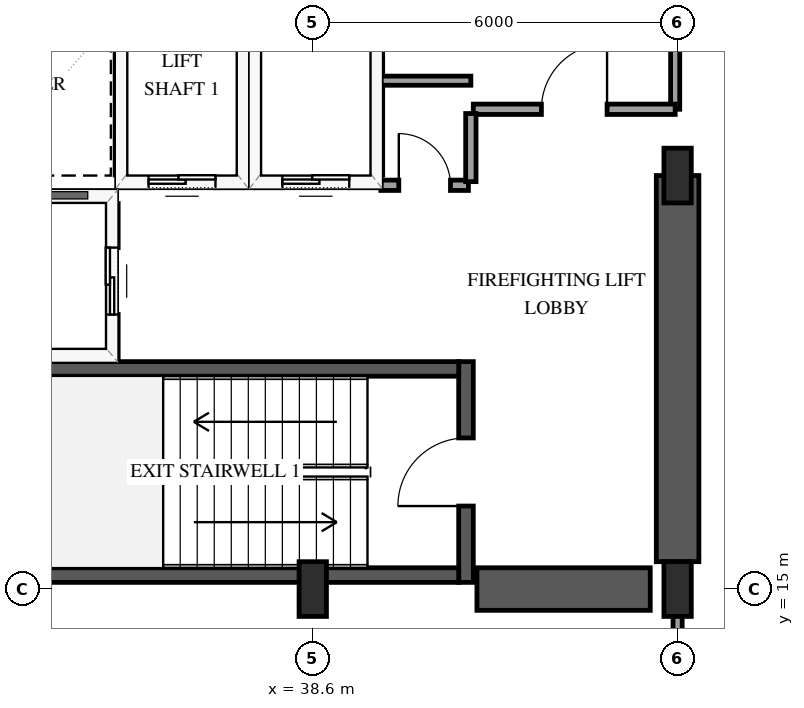
"""IFC4 building model, lengths in metres.
Left out: names, types, materials, properties, quantities, classifications, styles, units other than length and angle.
Written with IfcOpenShell. Run it as: python <this file> out.ifc"""

import sys

from ifc_helpers import new_model, si_unit, direction, frame, frame_2d, origin, origin_2d, place, context, subcontext, project, spatial, rectangle, extrude, element, fill, save


model = new_model("IFC4")
c1 = context("Model", 3, precision=1e-05, world=origin(), true_north=direction((0.0, 1.0)))
c2 = subcontext(c1, "Body", "Model", "MODEL_VIEW")
j1 = project(units=[si_unit("LENGTHUNIT", "METRE"), si_unit("PLANEANGLEUNIT", "RADIAN")], contexts=[c1])
p1 = place(None, origin())
s1 = spatial("IfcSite", under=j1, at=p1, CompositionType="ELEMENT")
p2 = place(p1, origin())
s2 = spatial("IfcBuilding", under=s1, at=p2, CompositionType="ELEMENT")
p3 = place(p2, frame((0.0, 0.0, 20.7)))
s3 = spatial("IfcBuildingStorey", under=s2, at=p3, CompositionType="ELEMENT", Elevation=20.7)
p4 = place(p3, frame((41.12, 15.11, 0.0), z_axis=(0.0, 0.0, 1.0), x_axis=(0.0, 1.0, 0.0)))
e1 = element("IfcWall", 1, at=p4, inside=s3, PredefinedType="SHEAR", context=c2, shape_type="SweptSolid", body=[
    extrude(rectangle(XDim=3.63, YDim=0.24, at=frame_2d((1.815, 0.0))), origin(), (0.0, 0.0, 1.0), 4.5),
])
p5 = place(p4, frame((1.255, 0.0, 0.0)))
e2 = element("IfcOpeningElement", 2, at=p5, cuts=e1, PredefinedType="OPENING", context=c2, shape_type="SweptSolid", body=[
    extrude(rectangle(XDim=1.12, YDim=2.15, at=frame_2d((0.56, 1.075))), frame((0.0, 0.13, 0.0), z_axis=(0.0, -1.0, 0.0), x_axis=(1.0, 0.0, 0.0)), (0.0, 0.0, 1.0), 0.26),
])
for number, where, z_axis, x_axis in (
    (3, (33.0, 15.23, 0.0), (0.0, 0.0, 1.0), (1.0, 0.0, 0.0)),
    (4, (33.0, 18.62, 0.0), (0.0, 0.0, 1.0), (1.0, 0.0, 0.0)),
):
    element("IfcWall", number, at=place(p3, frame(where, z_axis=z_axis, x_axis=x_axis)), inside=s3, PredefinedType="SHEAR", context=c2, shape_type="SweptSolid", body=[
        extrude(rectangle(XDim=8.0, YDim=0.24, at=frame_2d((4.0, 0.0))), origin(), (0.0, 0.0, 1.0), 4.5),
    ])
p6 = place(p3, frame((41.3, 15.0, 0.0), z_axis=(0.0, 0.0, 1.0), x_axis=(1.0, 0.0, 0.0)))
e5 = element("IfcWall", 5, at=p6, inside=s3, PredefinedType="SHEAR", context=c2, shape_type="SweptSolid", body=[
    extrude(rectangle(XDim=2.85, YDim=0.7, at=frame_2d((1.425, 0.0))), origin(), (0.0, 0.0, 1.0), 4.5),
])
p7 = place(p3, frame((44.6, 15.45, 0.0), z_axis=(0.0, 0.0, 1.0), x_axis=(0.0, 1.0, 0.0)))
e6 = element("IfcWall", 6, at=p7, inside=s3, PredefinedType="SHEAR", context=c2, shape_type="SweptSolid", body=[
    extrude(rectangle(XDim=6.35, YDim=0.7, at=frame_2d((3.175, 0.0))), origin(), (0.0, 0.0, 1.0), 4.5),
])
for number, where, z_axis, x_axis in (
    (7, (38.6, 15.0, 0.0), (0.0, 0.0, 1.0), (1.0, 0.0, 0.0)),
    (8, (44.6, 15.0, 0.0), (0.0, 0.0, 1.0), (1.0, 0.0, 0.0)),
    (9, (44.6, 21.8, 0.0), (0.0, 0.0, 1.0), (1.0, 0.0, 0.0)),
):
    element("IfcColumn", number, at=place(p3, frame(where, z_axis=z_axis, x_axis=x_axis)), inside=s3, PredefinedType="PILASTER", context=c2, shape_type="SweptSolid", body=[
        extrude(rectangle(XDim=0.45, YDim=0.9, at=origin_2d()), origin(), (0.0, 0.0, 1.0), 4.5),
    ])
p8 = place(p3, frame((35.45, 21.7, 0.0), z_axis=(0.0, 0.0, 1.0), x_axis=(1.0, 0.0, 0.0)))
e10 = element("IfcWall", 10, at=p8, inside=s3, PredefinedType="SOLIDWALL", context=c2, shape_type="SweptSolid", body=[
    extrude(rectangle(XDim=2.0, YDim=0.2, at=frame_2d((1.0, 0.0))), origin(), (0.0, 0.0, 1.0), 4.18),
])
p9 = place(p8, frame((0.45, 0.0, 0.0)))
e11 = element("IfcOpeningElement", 11, at=p9, cuts=e10, PredefinedType="OPENING", context=c2, shape_type="SweptSolid", body=[
    extrude(rectangle(XDim=1.1, YDim=2.15, at=frame_2d((0.55, 1.075))), frame((0.0, 0.11, 0.0), z_axis=(0.0, -1.0, 0.0), x_axis=(1.0, 0.0, 0.0)), (0.0, 0.0, 1.0), 0.22),
])
for number, where, z_axis, x_axis in (
    (12, (35.45, 21.81, 0.0), (0.0, 0.0, 1.0), (0.0, 1.0, 0.0)),
    (13, (37.45, 21.81, 0.0), (0.0, 0.0, 1.0), (0.0, 1.0, 0.0)),
):
    element("IfcWall", number, at=place(p3, frame(where, z_axis=z_axis, x_axis=x_axis)), inside=s3, PredefinedType="SOLIDWALL", context=c2, shape_type="SweptSolid", body=[
        extrude(rectangle(XDim=2.38, YDim=0.2, at=frame_2d((1.19, 0.0))), origin(), (0.0, 0.0, 1.0), 4.18),
    ])
p10 = place(p3, frame((37.65, 21.7, 0.0), z_axis=(0.0, 0.0, 1.0), x_axis=(1.0, 0.0, 0.0)))
e14 = element("IfcWall", 14, at=p10, inside=s3, PredefinedType="SOLIDWALL", context=c2, shape_type="SweptSolid", body=[
    extrude(rectangle(XDim=2.0, YDim=0.2, at=frame_2d((1.0, 0.0))), origin(), (0.0, 0.0, 1.0), 4.18),
])
p11 = place(p10, frame((0.45, 0.0, 0.0)))
e15 = element("IfcOpeningElement", 15, at=p11, cuts=e14, PredefinedType="OPENING", context=c2, shape_type="SweptSolid", body=[
    extrude(rectangle(XDim=1.1, YDim=2.15, at=frame_2d((0.55, 1.075))), frame((0.0, 0.11, 0.0), z_axis=(0.0, -1.0, 0.0), x_axis=(1.0, 0.0, 0.0)), (0.0, 0.0, 1.0), 0.22),
])
p12 = place(p3, frame((39.65, 21.81, 0.0), z_axis=(0.0, 0.0, 1.0), x_axis=(0.0, 1.0, 0.0)))
e16 = element("IfcWall", 16, at=p12, inside=s3, PredefinedType="SOLIDWALL", context=c2, shape_type="SweptSolid", body=[
    extrude(rectangle(XDim=2.38, YDim=0.2, at=frame_2d((1.19, 0.0))), origin(), (0.0, 0.0, 1.0), 4.18),
])
p13 = place(p3, frame((32.72, 21.45, 0.0), z_axis=(0.0, 0.0, 1.0), x_axis=(1.0, 0.0, 0.0)))
e17 = element("IfcWall", 17, at=p13, inside=s3, PredefinedType="SOLIDWALL", context=c2, shape_type="SweptSolid", body=[
    extrude(rectangle(XDim=2.58, YDim=0.2, at=frame_2d((1.29, 0.0))), origin(), (0.0, 0.0, 1.0), 4.18),
])
p14 = place(p3, frame((35.3, 18.79, 0.0), z_axis=(0.0, 0.0, 1.0), x_axis=(0.0, 1.0, 0.0)))
e18 = element("IfcWall", 18, at=p14, inside=s3, PredefinedType="SOLIDWALL", context=c2, shape_type="SweptSolid", body=[
    extrude(rectangle(XDim=2.55, YDim=0.2, at=frame_2d((1.275, 0.0))), origin(), (0.0, 0.0, 1.0), 4.18),
])
p15 = place(p14, frame((0.725, 0.0, 0.0)))
e19 = element("IfcOpeningElement", 19, at=p15, cuts=e18, PredefinedType="OPENING", context=c2, shape_type="SweptSolid", body=[
    extrude(rectangle(XDim=1.1, YDim=2.15, at=frame_2d((0.55, 1.075))), frame((0.0, 0.11, 0.0), z_axis=(0.0, -1.0, 0.0), x_axis=(1.0, 0.0, 0.0)), (0.0, 0.0, 1.0), 0.22),
])
p16 = place(p3, frame((44.56, 29.8, 0.0), z_axis=(0.0, 0.0, 1.0), x_axis=(0.0, -1.0, 0.0)))
e20 = element("IfcWall", 20, at=p16, inside=s3, PredefinedType="PARTITIONING", context=c2, shape_type="SweptSolid", body=[
    extrude(rectangle(XDim=6.91, YDim=0.15, at=frame_2d((3.455, 0.0))), origin(), (0.0, 0.0, 1.0), 3.22),
])
p17 = place(p16, frame((2.915, 0.0, 0.0)))
e21 = element("IfcOpeningElement", 21, at=p17, cuts=e20, PredefinedType="OPENING", context=c2, shape_type="SweptSolid", body=[
    extrude(rectangle(XDim=1.38, YDim=2.2, at=frame_2d((0.69, 1.1))), frame((0.0, 0.085, 0.0), z_axis=(0.0, -1.0, 0.0), x_axis=(1.0, 0.0, 0.0)), (0.0, 0.0, 1.0), 0.17),
])
p18 = place(p3, frame((41.24, 22.89, 0.0), z_axis=(0.0, 0.0, 1.0), x_axis=(1.0, 0.0, 0.0)))
e22 = element("IfcWall", 22, at=p18, inside=s3, PredefinedType="PARTITIONING", context=c2, shape_type="SweptSolid", body=[
    extrude(rectangle(XDim=3.32, YDim=0.17, at=frame_2d((1.66, 0.0))), origin(), (0.0, 0.0, 1.0), 4.18),
])
p19 = place(p18, frame((1.12, 0.0, 0.0)))
e23 = element("IfcOpeningElement", 23, at=p19, cuts=e22, PredefinedType="OPENING", context=c2, shape_type="SweptSolid", body=[
    extrude(rectangle(XDim=1.08, YDim=2.15, at=frame_2d((0.54, 1.075))), frame((0.0, 0.095, 0.0), z_axis=(0.0, -1.0, 0.0), x_axis=(1.0, 0.0, 0.0)), (0.0, 0.0, 1.0), 0.19),
])
p20 = place(p3, frame((44.6, 11.87, 0.0), z_axis=(0.0, 0.0, 1.0), x_axis=(0.0, 1.0, 0.0)))
e24 = element("IfcWall", 24, at=p20, inside=s3, PredefinedType="PARTITIONING", context=c2, shape_type="SweptSolid", body=[
    extrude(rectangle(XDim=3.06, YDim=0.15, at=frame_2d((1.53, 0.0))), origin(), (0.0, 0.0, 1.0), 3.302),
])
p21 = place(p3, frame((39.72, 21.64, 0.0), z_axis=(0.0, 0.0, 1.0), x_axis=(1.0, 0.0, 0.0)))
e25 = element("IfcWall", 25, at=p21, inside=s3, PredefinedType="PARTITIONING", context=c2, shape_type="SweptSolid", body=[
    extrude(rectangle(XDim=1.44, YDim=0.17, at=frame_2d((0.72, 0.0))), origin(), (0.0, 0.0, 1.0), 4.18),
])
p22 = place(p21, frame((0.295, 0.0, 0.0)))
e26 = element("IfcOpeningElement", 26, at=p22, cuts=e25, PredefinedType="OPENING", context=c2, shape_type="SweptSolid", body=[
    extrude(rectangle(XDim=0.85, YDim=2.1, at=frame_2d((0.425, 1.05))), frame((0.0, 0.095, 0.0), z_axis=(0.0, -1.0, 0.0), x_axis=(1.0, 0.0, 0.0)), (0.0, 0.0, 1.0), 0.19),
])
p23 = place(p3, frame((41.2, 21.7, 0.0), z_axis=(0.0, 0.0, 1.0), x_axis=(0.0, 1.0, 0.0)))
e27 = element("IfcWall", 27, at=p23, inside=s3, PredefinedType="PARTITIONING", context=c2, shape_type="SweptSolid", body=[
    extrude(rectangle(XDim=1.12, YDim=0.17, at=frame_2d((0.56, 0.0))), origin(), (0.0, 0.0, 1.0), 4.18),
])
p24 = place(p3, frame((41.2, 23.36, 0.0), z_axis=(0.0, 0.0, 1.0), x_axis=(-1.0, 0.0, 0.0)))
e28 = element("IfcWall", 28, at=p24, inside=s3, PredefinedType="PARTITIONING", context=c2, shape_type="SweptSolid", body=[
    extrude(rectangle(XDim=1.48, YDim=0.15, at=frame_2d((0.74, 0.0))), origin(), (0.0, 0.0, 1.0), 4.18),
])
p25 = place(p9, origin())
e29 = element("IfcDoor", 29, at=p25, inside=s3, OperationType="SLIDING_TO_LEFT", PredefinedType="DOOR", context=c2, shape_type="SweptSolid", body=[
    extrude(rectangle(XDim=1.1, YDim=2.15, at=frame_2d((0.55, 1.075))), frame((0.0, 0.025, 0.0), z_axis=(0.0, -1.0, 0.0), x_axis=(1.0, 0.0, 0.0)), (0.0, 0.0, 1.0), 0.05),
])
fill(e11, e29)
p26 = place(p11, origin())
e30 = element("IfcDoor", 30, at=p26, inside=s3, OperationType="SLIDING_TO_LEFT", PredefinedType="DOOR", context=c2, shape_type="SweptSolid", body=[
    extrude(rectangle(XDim=1.1, YDim=2.15, at=frame_2d((0.55, 1.075))), frame((0.0, 0.025, 0.0), z_axis=(0.0, -1.0, 0.0), x_axis=(1.0, 0.0, 0.0)), (0.0, 0.0, 1.0), 0.05),
])
fill(e15, e30)
p27 = place(p15, origin())
e31 = element("IfcDoor", 31, at=p27, inside=s3, OperationType="SLIDING_TO_LEFT", PredefinedType="DOOR", context=c2, shape_type="SweptSolid", body=[
    extrude(rectangle(XDim=1.1, YDim=2.15, at=frame_2d((0.55, 1.075))), frame((0.0, 0.025, 0.0), z_axis=(0.0, -1.0, 0.0), x_axis=(1.0, 0.0, 0.0)), (0.0, 0.0, 1.0), 0.05),
])
fill(e19, e31)
p28 = place(p5, origin())
e32 = element("IfcDoor", 32, at=p28, inside=s3, OperationType="SINGLE_SWING_LEFT", PredefinedType="DOOR", context=c2, shape_type="SweptSolid", body=[
    extrude(rectangle(XDim=1.12, YDim=2.15, at=frame_2d((0.56, 1.075))), frame((0.0, 0.025, 0.0), z_axis=(0.0, -1.0, 0.0), x_axis=(1.0, 0.0, 0.0)), (0.0, 0.0, 1.0), 0.05),
])
fill(e2, e32)
p29 = place(p19, origin())
e33 = element("IfcDoor", 33, at=p29, inside=s3, OperationType="SINGLE_SWING_RIGHT", PredefinedType="DOOR", context=c2, shape_type="SweptSolid", body=[
    extrude(rectangle(XDim=1.08, YDim=2.15, at=frame_2d((0.54, 1.075))), frame((0.0, 0.025, 0.0), z_axis=(0.0, -1.0, 0.0), x_axis=(1.0, 0.0, 0.0)), (0.0, 0.0, 1.0), 0.05),
])
fill(e23, e33)
p30 = place(p22, origin())
e34 = element("IfcDoor", 34, at=p30, inside=s3, OperationType="SINGLE_SWING_LEFT", PredefinedType="DOOR", context=c2, shape_type="SweptSolid", body=[
    extrude(rectangle(XDim=0.85, YDim=2.1, at=frame_2d((0.425, 1.05))), frame((0.0, 0.025, 0.0), z_axis=(0.0, -1.0, 0.0), x_axis=(1.0, 0.0, 0.0)), (0.0, 0.0, 1.0), 0.05),
])
fill(e26, e34)
save(model, sys.argv[1])
